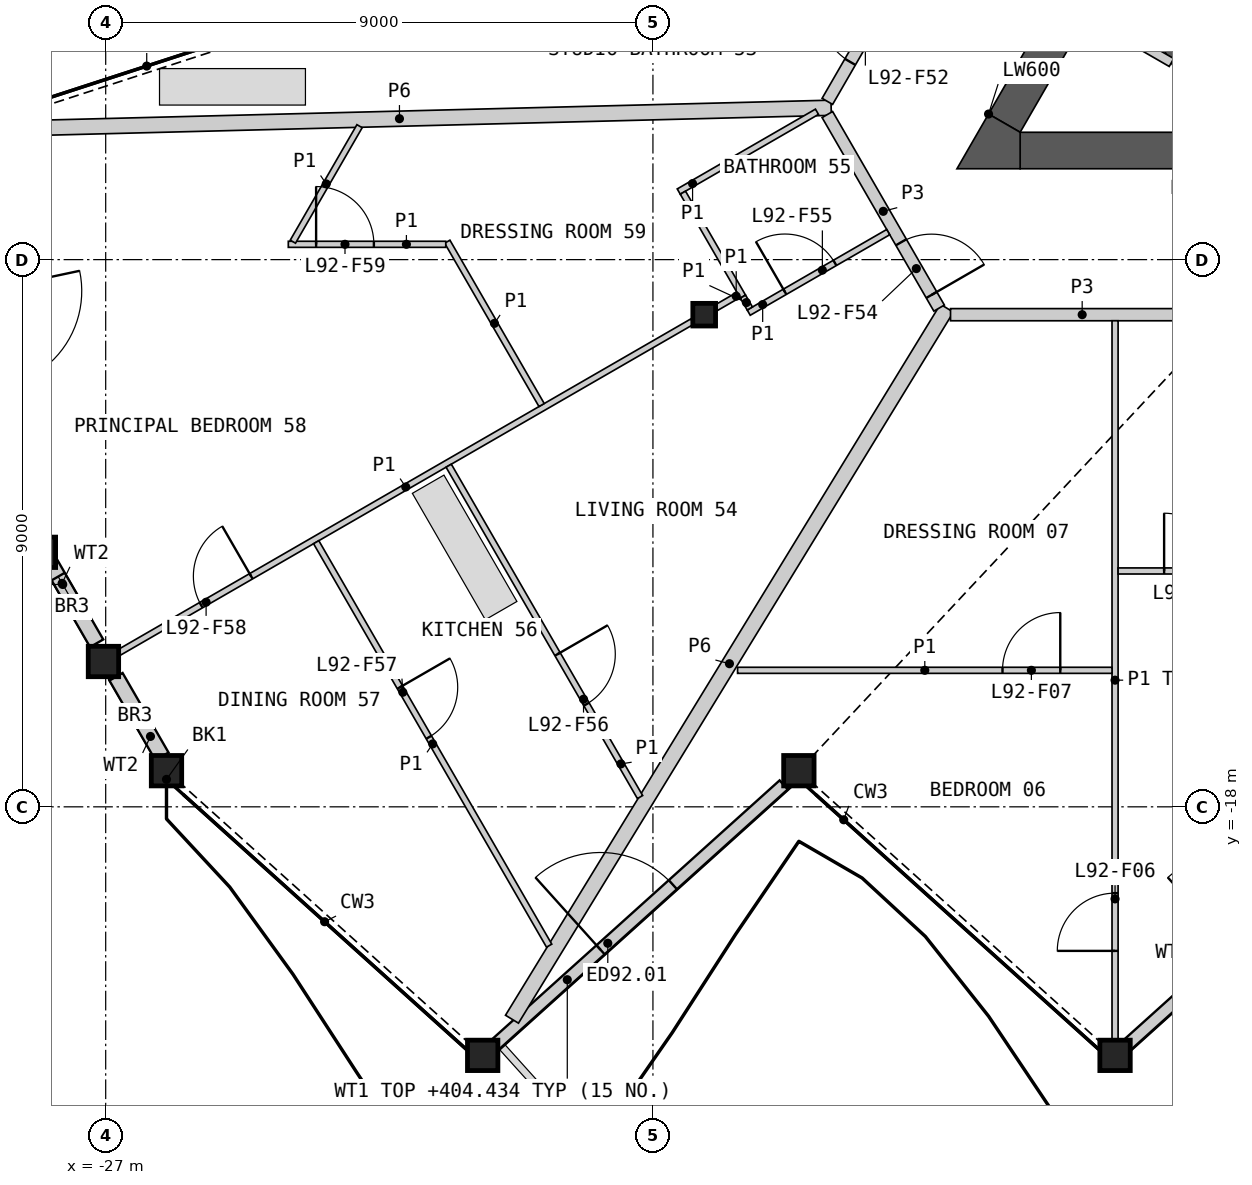
"""IFC4 building model, lengths in metres.
Left out: names, types, materials, properties, quantities, classifications, styles, units other than length and angle.
Written with IfcOpenShell. Run it as: python <this file> out.ifc"""

import sys

from ifc_helpers import new_model, si_unit, direction, frame, frame_2d, origin, origin_2d, place, context, subcontext, project, spatial, polyline, rectangle, hollow_rectangle, i_section, outline, extrude, element, fill, save


model = new_model("IFC4")
c1 = context("Model", 3, precision=1e-05, world=origin(), true_north=direction((0.0, 1.0)))
c2 = subcontext(c1, "Body", "Model", "MODEL_VIEW")
j1 = project(units=[si_unit("LENGTHUNIT", "METRE"), si_unit("PLANEANGLEUNIT", "RADIAN")], contexts=[c1])
p1 = place(None, origin())
s1 = spatial("IfcSite", under=j1, at=p1, CompositionType="ELEMENT")
p2 = place(p1, origin())
s2 = spatial("IfcBuilding", under=s1, at=p2, CompositionType="ELEMENT")
p3 = place(p2, frame((0.0, 0.0, 401.8)))
s3 = spatial("IfcBuildingStorey", under=s2, at=p3, CompositionType="ELEMENT", Elevation=401.8)
for number, where, z_axis, x_axis in (
    (1, (-26.0, -17.406, 0.0), (0.0, 0.0, 1.0), (1.0, 0.0, 0.0)),
    (2, (-20.8, -22.088, 0.0), (0.0, 0.0, 1.0), (1.0, 0.0, 0.0)),
    (3, (-15.6, -17.406, 0.0), (0.0, 0.0, 1.0), (1.0, 0.0, 0.0)),
    (4, (-10.4, -22.088, 0.0), (0.0, 0.0, 1.0), (1.0, 0.0, 0.0)),
    (5, (-28.074, -13.814, 0.0), (0.0, 0.0, 1.0), (1.0, 0.0, 0.0)),
    (6, (-27.037, -15.61, 0.0), (0.0, 0.0, 1.0), (1.0, 0.0, 0.0)),
):
    element("IfcColumn", number, at=place(p3, frame(where, z_axis=z_axis, x_axis=x_axis)), inside=s3, PredefinedType="COLUMN", context=c2, shape_type="SweptSolid", body=[
        extrude(hollow_rectangle(XDim=0.5, YDim=0.5, WallThickness=0.03, at=origin_2d()), origin(), (0.0, 0.0, 1.0), 3.4),
    ])
p4 = place(p3, frame((-17.157, -9.906, 0.0), z_axis=(0.0, 0.0, 1.0), x_axis=(1.0, 0.0, 0.0)))
e7 = element("IfcColumn", 7, at=p4, inside=s3, PredefinedType="COLUMN", context=c2, shape_type="SweptSolid", body=[
    extrude(i_section(OverallWidth=0.374, OverallDepth=0.372, WebThickness=0.016, FlangeThickness=0.026, at=origin_2d()), origin(), (0.0, 0.0, 1.0), 3.4),
])
p5 = place(p3, frame((-20.595, -21.912, 0.0), z_axis=(0.0, 0.0, 1.0), x_axis=(0.743132515916, 0.669144277259, 0.0)))
e8 = element("IfcWall", 8, at=p5, inside=s3, PredefinedType="SOLIDWALL", context=c2, shape_type="SweptSolid", body=[
    extrude(rectangle(XDim=6.385, YDim=0.2, at=frame_2d((3.192, 0.0))), origin(), (0.0, 0.0, 1.0), 2.634),
])
p6 = place(p5, frame((2.333, 0.0, 0.0)))
e9 = element("IfcOpeningElement", 9, at=p6, cuts=e8, PredefinedType="OPENING", context=c2, shape_type="SweptSolid", body=[
    extrude(rectangle(XDim=1.6, YDim=2.25, at=frame_2d((0.8, 1.125))), frame((0.0, 0.11, 0.0), z_axis=(0.0, -1.0, 0.0), x_axis=(1.0, 0.0, 0.0)), (0.0, 0.0, 1.0), 0.22),
])
p7 = place(p3, frame((-10.195, -21.912, 0.0), z_axis=(0.0, 0.0, 1.0), x_axis=(0.743132515916, 0.669144277259, 0.0)))
e10 = element("IfcWall", 10, at=p7, inside=s3, PredefinedType="SOLIDWALL", context=c2, shape_type="SweptSolid", body=[
    extrude(rectangle(XDim=6.385, YDim=0.2, at=frame_2d((3.192, 0.0))), origin(), (0.0, 0.0, 1.0), 2.634),
])
p8 = place(p7, frame((2.333, 0.0, 0.0)))
e11 = element("IfcOpeningElement", 11, at=p8, cuts=e10, PredefinedType="OPENING", context=c2, shape_type="SweptSolid", body=[
    extrude(rectangle(XDim=1.6, YDim=2.25, at=frame_2d((0.8, 1.125))), frame((0.0, 0.11, 0.0), z_axis=(0.0, -1.0, 0.0), x_axis=(1.0, 0.0, 0.0)), (0.0, 0.0, 1.0), 0.22),
])
p9 = place(p3, frame((-27.906, -13.997, 0.0), z_axis=(0.0, 0.0, 1.0), x_axis=(0.499931517724, -0.866064938435, 0.0)))
e12 = element("IfcWall", 12, at=p9, inside=s3, PredefinedType="SOLIDWALL", context=c2, shape_type="SweptSolid", body=[
    extrude(rectangle(XDim=1.516, YDim=0.25, at=frame_2d((0.758, 0.0))), origin(), (0.0, 0.0, 1.0), 2.634),
])
p10 = place(p9, frame((0.25, 0.0, 1.7)))
e13 = element("IfcOpeningElement", 13, at=p10, cuts=e12, PredefinedType="OPENING", context=c2, shape_type="SweptSolid", body=[
    extrude(rectangle(XDim=0.6, YDim=0.7, at=frame_2d((0.3, 0.35))), frame((0.0, 0.135, 0.0), z_axis=(0.0, -1.0, 0.0), x_axis=(1.0, 0.0, 0.0)), (0.0, 0.0, 1.0), 0.27),
])
p11 = place(p3, frame((-26.83, -15.861, 0.0), z_axis=(0.0, 0.0, 1.0), x_axis=(0.500048779063, -0.865997239347, 0.0)))
e14 = element("IfcWall", 14, at=p11, inside=s3, PredefinedType="SOLIDWALL", context=c2, shape_type="SweptSolid", body=[
    extrude(rectangle(XDim=1.511, YDim=0.25, at=frame_2d((0.755, 0.0))), origin(), (0.0, 0.0, 1.0), 2.634),
])
p12 = place(p3, origin())
e15 = element("IfcWall", 15, at=p12, inside=s3, PredefinedType="SHEAR", context=c2, shape_type="SweptSolid", body=[
    extrude(outline(polyline([(-10.374, -4.206), (-8.83, -6.881), (-8.738, -6.539), (-10.032, -4.298), (-10.374, -4.206)])), origin(), (0.0, 0.0, 1.0), 3.1),
])
p13 = place(p3, frame((-10.842, -4.967, 0.0), z_axis=(0.0, 0.0, 1.0), x_axis=(0.866098216386, -0.499873863663, 0.0)))
e16 = element("IfcWall", 16, at=p13, inside=s3, PredefinedType="PARTITIONING", context=c2, shape_type="SweptSolid", body=[
    extrude(rectangle(XDim=1.582, YDim=0.15, at=frame_2d((0.791, 0.0))), origin(), (0.0, 0.0, 1.0), 3.1),
])
p14 = place(p3, frame((-11.961, -7.206, 0.0), z_axis=(0.0, 0.0, 1.0), x_axis=(1.0, 0.0, 0.0)))
e17 = element("IfcWall", 17, at=p14, inside=s3, PredefinedType="SHEAR", context=c2, shape_type="SweptSolid", body=[
    extrude(rectangle(XDim=4.868, YDim=0.6, at=frame_2d((2.434, 0.0))), origin(), (0.0, 0.0, 1.0), 3.1),
])
p15 = place(p3, frame((-9.941, -2.807, 0.0), z_axis=(0.0, 0.0, 1.0), x_axis=(-0.500020646047, -0.866013483456, 0.0)))
e18 = element("IfcWall", 18, at=p15, inside=s3, PredefinedType="SHEAR", context=c2, shape_type="SweptSolid", body=[
    extrude(rectangle(XDim=4.559, YDim=0.6, at=frame_2d((2.28, 0.0))), origin(), (0.0, 0.0, 1.0), 3.1),
])
p16 = place(p3, origin())
e19 = element("IfcWall", 19, at=p16, inside=s3, PredefinedType="SHEAR", context=c2, shape_type="SweptSolid", body=[
    extrude(outline(polyline([(-12.48, -6.606), (-11.961, -6.906), (-11.961, -7.506), (-13.0, -7.506), (-12.48, -6.606)])), origin(), (0.0, 0.0, 1.0), 3.1),
])
p17 = place(p3, frame((-29.269, -6.862, 0.0), z_axis=(0.0, 0.0, 1.0), x_axis=(0.999679020594, 0.025334872878, 0.0)))
e20 = element("IfcWall", 20, at=p17, inside=s3, PredefinedType="PARTITIONING", context=c2, shape_type="SweptSolid", body=[
    extrude(rectangle(XDim=14.204, YDim=0.25, at=frame_2d((7.102, 0.0))), origin(), (0.0, 0.0, 1.0), 2.33),
])
p18 = place(p3, frame((-20.318, -21.493, 0.0), z_axis=(0.0, 0.0, 1.0), x_axis=(0.52177126778, 0.853085426039, 0.0)))
e21 = element("IfcWall", 21, at=p18, inside=s3, PredefinedType="PARTITIONING", context=c2, shape_type="SweptSolid", body=[
    extrude(rectangle(XDim=13.708, YDim=0.25, at=frame_2d((6.854, 0.0))), origin(), (0.0, 0.0, 1.0), 2.33),
])
p19 = place(p3, frame((-13.106, -9.906, 0.0), z_axis=(0.0, 0.0, 1.0), x_axis=(1.0, 0.0, 0.0)))
e22 = element("IfcWall", 22, at=p19, inside=s3, PredefinedType="PARTITIONING", context=c2, shape_type="SweptSolid", body=[
    extrude(rectangle(XDim=4.331, YDim=0.2, at=frame_2d((2.165, 0.0))), origin(), (0.0, 0.0, 1.0), 3.1),
])
p20 = place(p3, frame((-15.131, -6.397, 0.0), z_axis=(0.0, 0.0, 1.0), x_axis=(0.499986217557, 0.866033360935, 0.0)))
e23 = element("IfcWall", 23, at=p20, inside=s3, PredefinedType="PARTITIONING", context=c2, shape_type="SweptSolid", body=[
    extrude(rectangle(XDim=4.3, YDim=0.2, at=frame_2d((2.15, 0.0))), origin(), (0.0, 0.0, 1.0), 3.1),
])
p21 = place(p20, frame((0.75, 0.0, 0.0)))
e24 = element("IfcOpeningElement", 24, at=p21, cuts=e23, PredefinedType="OPENING", context=c2, shape_type="SweptSolid", body=[
    extrude(rectangle(XDim=1.0, YDim=2.1, at=frame_2d((0.5, 1.05))), frame((0.0, 0.11, 0.0), z_axis=(0.0, -1.0, 0.0), x_axis=(1.0, 0.0, 0.0)), (0.0, 0.0, 1.0), 0.22),
])
p22 = place(p3, frame((-15.131, -6.614, 0.0), z_axis=(0.0, 0.0, 1.0), x_axis=(0.499967746641, -0.866044024469, 0.0)))
e25 = element("IfcWall", 25, at=p22, inside=s3, PredefinedType="PARTITIONING", context=c2, shape_type="SweptSolid", body=[
    extrude(rectangle(XDim=3.676, YDim=0.2, at=frame_2d((1.838, 0.0))), origin(), (0.0, 0.0, 1.0), 3.1),
])
p23 = place(p22, frame((2.426, 0.0, 0.0)))
e26 = element("IfcOpeningElement", 26, at=p23, cuts=e25, PredefinedType="OPENING", context=c2, shape_type="SweptSolid", body=[
    extrude(rectangle(XDim=1.0, YDim=2.1, at=frame_2d((0.5, 1.05))), frame((0.0, 0.11, 0.0), z_axis=(0.0, -1.0, 0.0), x_axis=(1.0, 0.0, 0.0)), (0.0, 0.0, 1.0), 0.22),
])
p24 = place(p3, frame((-10.4, -21.828, 0.0), z_axis=(0.0, 0.0, 1.0), x_axis=(0.0, 1.0, 0.0)))
e27 = element("IfcWall", 27, at=p24, inside=s3, PredefinedType="PARTITIONING", context=c2, shape_type="SweptSolid", body=[
    extrude(rectangle(XDim=11.822, YDim=0.1, at=frame_2d((5.911, 0.0))), origin(), (0.0, 0.0, 1.0), 2.33),
])
p25 = place(p24, frame((1.458, 0.0, 0.0)))
e28 = element("IfcOpeningElement", 28, at=p25, cuts=e27, PredefinedType="OPENING", context=c2, shape_type="SweptSolid", body=[
    extrude(rectangle(XDim=0.95, YDim=2.1, at=frame_2d((0.475, 1.05))), frame((0.0, 0.06, 0.0), z_axis=(0.0, -1.0, 0.0), x_axis=(1.0, 0.0, 0.0)), (0.0, 0.0, 1.0), 0.12),
])
p26 = place(p3, frame((-26.777, -15.46, 0.0), z_axis=(0.0, 0.0, 1.0), x_axis=(0.866019680922, 0.500009912158, 0.0)))
e29 = element("IfcWall", 29, at=p26, inside=s3, PredefinedType="PARTITIONING", context=c2, shape_type="SweptSolid", body=[
    extrude(rectangle(XDim=10.881, YDim=0.1, at=frame_2d((5.44, 0.0))), origin(), (0.0, 0.0, 1.0), 2.33),
])
p27 = place(p26, frame((1.554, 0.0, 0.0)))
e30 = element("IfcOpeningElement", 30, at=p27, cuts=e29, PredefinedType="OPENING", context=c2, shape_type="SweptSolid", body=[
    extrude(rectangle(XDim=0.95, YDim=2.1, at=frame_2d((0.475, 1.05))), frame((0.0, 0.06, 0.0), z_axis=(0.0, -1.0, 0.0), x_axis=(1.0, 0.0, 0.0)), (0.0, 0.0, 1.0), 0.12),
])
p28 = place(p3, frame((-23.538, -13.647, 0.0), z_axis=(0.0, 0.0, 1.0), x_axis=(0.499977115003, -0.86603861604, 0.0)))
e31 = element("IfcWall", 31, at=p28, inside=s3, PredefinedType="PARTITIONING", context=c2, shape_type="SweptSolid", body=[
    extrude(rectangle(XDim=7.662, YDim=0.1, at=frame_2d((3.831, 0.0))), origin(), (0.0, 0.0, 1.0), 2.33),
])
p29 = place(p28, frame((2.755, 0.0, 0.0)))
e32 = element("IfcOpeningElement", 32, at=p29, cuts=e31, PredefinedType="OPENING", context=c2, shape_type="SweptSolid", body=[
    extrude(rectangle(XDim=0.95, YDim=2.1, at=frame_2d((0.475, 1.05))), frame((0.0, 0.06, 0.0), z_axis=(0.0, -1.0, 0.0), x_axis=(1.0, 0.0, 0.0)), (0.0, 0.0, 1.0), 0.12),
])
p30 = place(p3, frame((-21.359, -12.389, 0.0), z_axis=(0.0, 0.0, 1.0), x_axis=(0.500006767202, -0.866021496703, 0.0)))
e33 = element("IfcWall", 33, at=p30, inside=s3, PredefinedType="PARTITIONING", context=c2, shape_type="SweptSolid", body=[
    extrude(rectangle(XDim=6.293, YDim=0.1, at=frame_2d((3.147, 0.0))), origin(), (0.0, 0.0, 1.0), 2.33),
])
p31 = place(p30, frame((3.58, 0.0, 0.0)))
e34 = element("IfcOpeningElement", 34, at=p31, cuts=e33, PredefinedType="OPENING", context=c2, shape_type="SweptSolid", body=[
    extrude(rectangle(XDim=0.95, YDim=2.1, at=frame_2d((0.475, 1.05))), frame((0.0, 0.06, 0.0), z_axis=(0.0, -1.0, 0.0), x_axis=(1.0, 0.0, 0.0)), (0.0, 0.0, 1.0), 0.12),
])
p32 = place(p3, frame((-16.608, -15.755, 0.0), z_axis=(0.0, 0.0, 1.0), x_axis=(1.0, 0.0, 0.0)))
e35 = element("IfcWall", 35, at=p32, inside=s3, PredefinedType="PARTITIONING", context=c2, shape_type="SweptSolid", body=[
    extrude(rectangle(XDim=6.158, YDim=0.1, at=frame_2d((3.079, 0.0))), origin(), (0.0, 0.0, 1.0), 2.33),
])
p33 = place(p32, frame((4.357, 0.0, 0.0)))
e36 = element("IfcOpeningElement", 36, at=p33, cuts=e35, PredefinedType="OPENING", context=c2, shape_type="SweptSolid", body=[
    extrude(rectangle(XDim=0.95, YDim=2.1, at=frame_2d((0.475, 1.05))), frame((0.0, 0.06, 0.0), z_axis=(0.0, -1.0, 0.0), x_axis=(1.0, 0.0, 0.0)), (0.0, 0.0, 1.0), 0.12),
])
p34 = place(p3, frame((-10.35, -14.121, 0.0), z_axis=(0.0, 0.0, 1.0), x_axis=(1.0, 0.0, 0.0)))
e37 = element("IfcWall", 37, at=p34, inside=s3, PredefinedType="PARTITIONING", context=c2, shape_type="SweptSolid", body=[
    extrude(rectangle(XDim=5.1, YDim=0.1, at=frame_2d((2.55, 0.0))), origin(), (0.0, 0.0, 1.0), 2.33),
])
p35 = place(p34, frame((0.757, 0.0, 0.0)))
e38 = element("IfcOpeningElement", 38, at=p35, cuts=e37, PredefinedType="OPENING", context=c2, shape_type="SweptSolid", body=[
    extrude(rectangle(XDim=0.95, YDim=2.1, at=frame_2d((0.475, 1.05))), frame((0.0, 0.06, 0.0), z_axis=(0.0, -1.0, 0.0), x_axis=(1.0, 0.0, 0.0)), (0.0, 0.0, 1.0), 0.12),
])
p36 = place(p3, frame((-21.382, -8.705, 0.0), z_axis=(0.0, 0.0, 1.0), x_axis=(0.50001536203, -0.866016534331, 0.0)))
e39 = element("IfcWall", 39, at=p36, inside=s3, PredefinedType="PARTITIONING", context=c2, shape_type="SweptSolid", body=[
    extrude(rectangle(XDim=3.103, YDim=0.1, at=frame_2d((1.551, 0.0))), origin(), (0.0, 0.0, 1.0), 2.33),
])
p37 = place(p3, frame((-17.575, -7.881, 0.0), z_axis=(0.0, 0.0, 1.0), x_axis=(0.866013657776, 0.500020344131, 0.0)))
e40 = element("IfcWall", 40, at=p37, inside=s3, PredefinedType="PARTITIONING", context=c2, shape_type="SweptSolid", body=[
    extrude(rectangle(XDim=2.625, YDim=0.1, at=frame_2d((1.312, 0.0))), origin(), (0.0, 0.0, 1.0), 2.33),
])
p38 = place(p3, frame((-16.425, -9.872, 0.0), z_axis=(0.0, 0.0, 1.0), x_axis=(0.865999882481, 0.50004420159, 0.0)))
e41 = element("IfcWall", 41, at=p38, inside=s3, PredefinedType="PARTITIONING", context=c2, shape_type="SweptSolid", body=[
    extrude(rectangle(XDim=2.649, YDim=0.1, at=frame_2d((1.325, 0.0))), origin(), (0.0, 0.0, 1.0), 2.33),
])
p39 = place(p38, frame((0.686, 0.0, 0.0)))
e42 = element("IfcOpeningElement", 42, at=p39, cuts=e41, PredefinedType="OPENING", context=c2, shape_type="SweptSolid", body=[
    extrude(rectangle(XDim=0.95, YDim=2.1, at=frame_2d((0.475, 1.05))), frame((0.0, 0.06, 0.0), z_axis=(0.0, -1.0, 0.0), x_axis=(1.0, 0.0, 0.0)), (0.0, 0.0, 1.0), 0.12),
])
p40 = place(p3, frame((-23.997, -8.748, 0.0), z_axis=(0.0, 0.0, 1.0), x_axis=(1.0, 0.0, 0.0)))
e43 = element("IfcWall", 43, at=p40, inside=s3, PredefinedType="PARTITIONING", context=c2, shape_type="SweptSolid", body=[
    extrude(rectangle(XDim=2.59, YDim=0.1, at=frame_2d((1.295, 0.0))), origin(), (0.0, 0.0, 1.0), 2.33),
])
p41 = place(p40, frame((0.457, 0.0, 0.0)))
e44 = element("IfcOpeningElement", 44, at=p41, cuts=e43, PredefinedType="OPENING", context=c2, shape_type="SweptSolid", body=[
    extrude(rectangle(XDim=0.95, YDim=2.1, at=frame_2d((0.475, 1.05))), frame((0.0, 0.06, 0.0), z_axis=(0.0, -1.0, 0.0), x_axis=(1.0, 0.0, 0.0)), (0.0, 0.0, 1.0), 0.12),
])
p42 = place(p3, frame((-23.922, -8.705, 0.0), z_axis=(0.0, 0.0, 1.0), x_axis=(0.50001794124, 0.866015045157, 0.0)))
e45 = element("IfcWall", 45, at=p42, inside=s3, PredefinedType="PARTITIONING", context=c2, shape_type="SweptSolid", body=[
    extrude(rectangle(XDim=2.193, YDim=0.1, at=frame_2d((1.097, 0.0))), origin(), (0.0, 0.0, 1.0), 2.33),
])
p43 = place(p3, frame((-17.507, -7.899, 0.0), z_axis=(0.0, 0.0, 1.0), x_axis=(0.499972416139, -0.866041328748, 0.0)))
e46 = element("IfcWall", 46, at=p43, inside=s3, PredefinedType="PARTITIONING", context=c2, shape_type="SweptSolid", body=[
    extrude(rectangle(XDim=1.973, YDim=0.1, at=frame_2d((0.986, 0.0))), origin(), (0.0, 0.0, 1.0), 2.33),
])
p44 = place(p3, frame((-16.96, -9.792, 0.0), z_axis=(0.0, 0.0, 1.0), x_axis=(0.866137484628, 0.499805820016, 0.0)))
e47 = element("IfcWall", 47, at=p44, inside=s3, PredefinedType="PARTITIONING", context=c2, shape_type="SweptSolid", body=[
    extrude(rectangle(XDim=0.423, YDim=0.1, at=frame_2d((0.211, 0.0))), origin(), (0.0, 0.0, 1.0), 2.33),
])
p45 = place(p3, frame((-16.519, -9.61, 0.0), z_axis=(0.0, 0.0, 1.0), x_axis=(0.50245032488, -0.864606078528, 0.0)))
e48 = element("IfcWall", 48, at=p45, inside=s3, PredefinedType="PARTITIONING", context=c2, shape_type="SweptSolid", body=[
    extrude(rectangle(XDim=0.224, YDim=0.1, at=frame_2d((0.112, 0.0))), origin(), (0.0, 0.0, 1.0), 2.33),
])
p46 = place(p6, origin())
e49 = element("IfcDoor", 49, at=p46, inside=s3, OperationType="DOUBLE_DOOR_SINGLE_SWING", PredefinedType="DOOR", context=c2, shape_type="SweptSolid", body=[
    extrude(rectangle(XDim=1.6, YDim=2.25, at=frame_2d((0.8, 1.125))), frame((0.0, 0.025, 0.0), z_axis=(0.0, -1.0, 0.0), x_axis=(1.0, 0.0, 0.0)), (0.0, 0.0, 1.0), 0.05),
])
fill(e9, e49)
p47 = place(p10, origin())
e50 = element("IfcWindow", 50, at=p47, inside=s3, PartitioningType="SINGLE_PANEL", PredefinedType="WINDOW", context=c2, shape_type="SweptSolid", body=[
    extrude(rectangle(XDim=0.6, YDim=0.7, at=frame_2d((0.3, 0.35))), frame((0.0, 0.03, 0.0), z_axis=(0.0, -1.0, 0.0), x_axis=(1.0, 0.0, 0.0)), (0.0, 0.0, 1.0), 0.06),
])
fill(e13, e50)
p48 = place(p35, origin())
e51 = element("IfcDoor", 51, at=p48, inside=s3, OperationType="SINGLE_SWING_LEFT", PredefinedType="DOOR", context=c2, shape_type="SweptSolid", body=[
    extrude(rectangle(XDim=0.95, YDim=2.1, at=frame_2d((0.475, 1.05))), frame((0.0, 0.025, 0.0), z_axis=(0.0, -1.0, 0.0), x_axis=(1.0, 0.0, 0.0)), (0.0, 0.0, 1.0), 0.05),
])
fill(e38, e51)
p49 = place(p25, origin())
e52 = element("IfcDoor", 52, at=p49, inside=s3, OperationType="SINGLE_SWING_LEFT", PredefinedType="DOOR", context=c2, shape_type="SweptSolid", body=[
    extrude(rectangle(XDim=0.95, YDim=2.1, at=frame_2d((0.475, 1.05))), frame((0.0, 0.025, 0.0), z_axis=(0.0, -1.0, 0.0), x_axis=(1.0, 0.0, 0.0)), (0.0, 0.0, 1.0), 0.05),
])
fill(e28, e52)
p50 = place(p33, origin())
e53 = element("IfcDoor", 53, at=p50, inside=s3, OperationType="SINGLE_SWING_RIGHT", PredefinedType="DOOR", context=c2, shape_type="SweptSolid", body=[
    extrude(rectangle(XDim=0.95, YDim=2.1, at=frame_2d((0.475, 1.05))), frame((0.0, 0.025, 0.0), z_axis=(0.0, -1.0, 0.0), x_axis=(1.0, 0.0, 0.0)), (0.0, 0.0, 1.0), 0.05),
])
fill(e36, e53)
p51 = place(p21, origin())
e54 = element("IfcDoor", 54, at=p51, inside=s3, OperationType="SINGLE_SWING_RIGHT", PredefinedType="DOOR", context=c2, shape_type="SweptSolid", body=[
    extrude(rectangle(XDim=1.0, YDim=2.1, at=frame_2d((0.5, 1.05))), frame((0.0, 0.025, 0.0), z_axis=(0.0, -1.0, 0.0), x_axis=(1.0, 0.0, 0.0)), (0.0, 0.0, 1.0), 0.05),
])
fill(e24, e54)
p52 = place(p23, origin())
e55 = element("IfcDoor", 55, at=p52, inside=s3, OperationType="SINGLE_SWING_RIGHT", PredefinedType="DOOR", context=c2, shape_type="SweptSolid", body=[
    extrude(rectangle(XDim=1.0, YDim=2.1, at=frame_2d((0.5, 1.05))), frame((0.0, 0.025, 0.0), z_axis=(0.0, -1.0, 0.0), x_axis=(1.0, 0.0, 0.0)), (0.0, 0.0, 1.0), 0.05),
])
fill(e26, e55)
p53 = place(p39, origin())
e56 = element("IfcDoor", 56, at=p53, inside=s3, OperationType="SINGLE_SWING_LEFT", PredefinedType="DOOR", context=c2, shape_type="SweptSolid", body=[
    extrude(rectangle(XDim=0.95, YDim=2.1, at=frame_2d((0.475, 1.05))), frame((0.0, 0.025, 0.0), z_axis=(0.0, -1.0, 0.0), x_axis=(1.0, 0.0, 0.0)), (0.0, 0.0, 1.0), 0.05),
])
fill(e42, e56)
p54 = place(p31, origin())
e57 = element("IfcDoor", 57, at=p54, inside=s3, OperationType="SINGLE_SWING_LEFT", PredefinedType="DOOR", context=c2, shape_type="SweptSolid", body=[
    extrude(rectangle(XDim=0.95, YDim=2.1, at=frame_2d((0.475, 1.05))), frame((0.0, 0.025, 0.0), z_axis=(0.0, -1.0, 0.0), x_axis=(1.0, 0.0, 0.0)), (0.0, 0.0, 1.0), 0.05),
])
fill(e34, e57)
p55 = place(p29, origin())
e58 = element("IfcDoor", 58, at=p55, inside=s3, OperationType="SINGLE_SWING_LEFT", PredefinedType="DOOR", context=c2, shape_type="SweptSolid", body=[
    extrude(rectangle(XDim=0.95, YDim=2.1, at=frame_2d((0.475, 1.05))), frame((0.0, 0.025, 0.0), z_axis=(0.0, -1.0, 0.0), x_axis=(1.0, 0.0, 0.0)), (0.0, 0.0, 1.0), 0.05),
])
fill(e32, e58)
p56 = place(p27, origin())
e59 = element("IfcDoor", 59, at=p56, inside=s3, OperationType="SINGLE_SWING_RIGHT", PredefinedType="DOOR", context=c2, shape_type="SweptSolid", body=[
    extrude(rectangle(XDim=0.95, YDim=2.1, at=frame_2d((0.475, 1.05))), frame((0.0, 0.025, 0.0), z_axis=(0.0, -1.0, 0.0), x_axis=(1.0, 0.0, 0.0)), (0.0, 0.0, 1.0), 0.05),
])
fill(e30, e59)
p57 = place(p41, origin())
e60 = element("IfcDoor", 60, at=p57, inside=s3, OperationType="SINGLE_SWING_LEFT", PredefinedType="DOOR", context=c2, shape_type="SweptSolid", body=[
    extrude(rectangle(XDim=0.95, YDim=2.1, at=frame_2d((0.475, 1.05))), frame((0.0, 0.025, 0.0), z_axis=(0.0, -1.0, 0.0), x_axis=(1.0, 0.0, 0.0)), (0.0, 0.0, 1.0), 0.05),
])
fill(e44, e60)
save(model, sys.argv[1])
